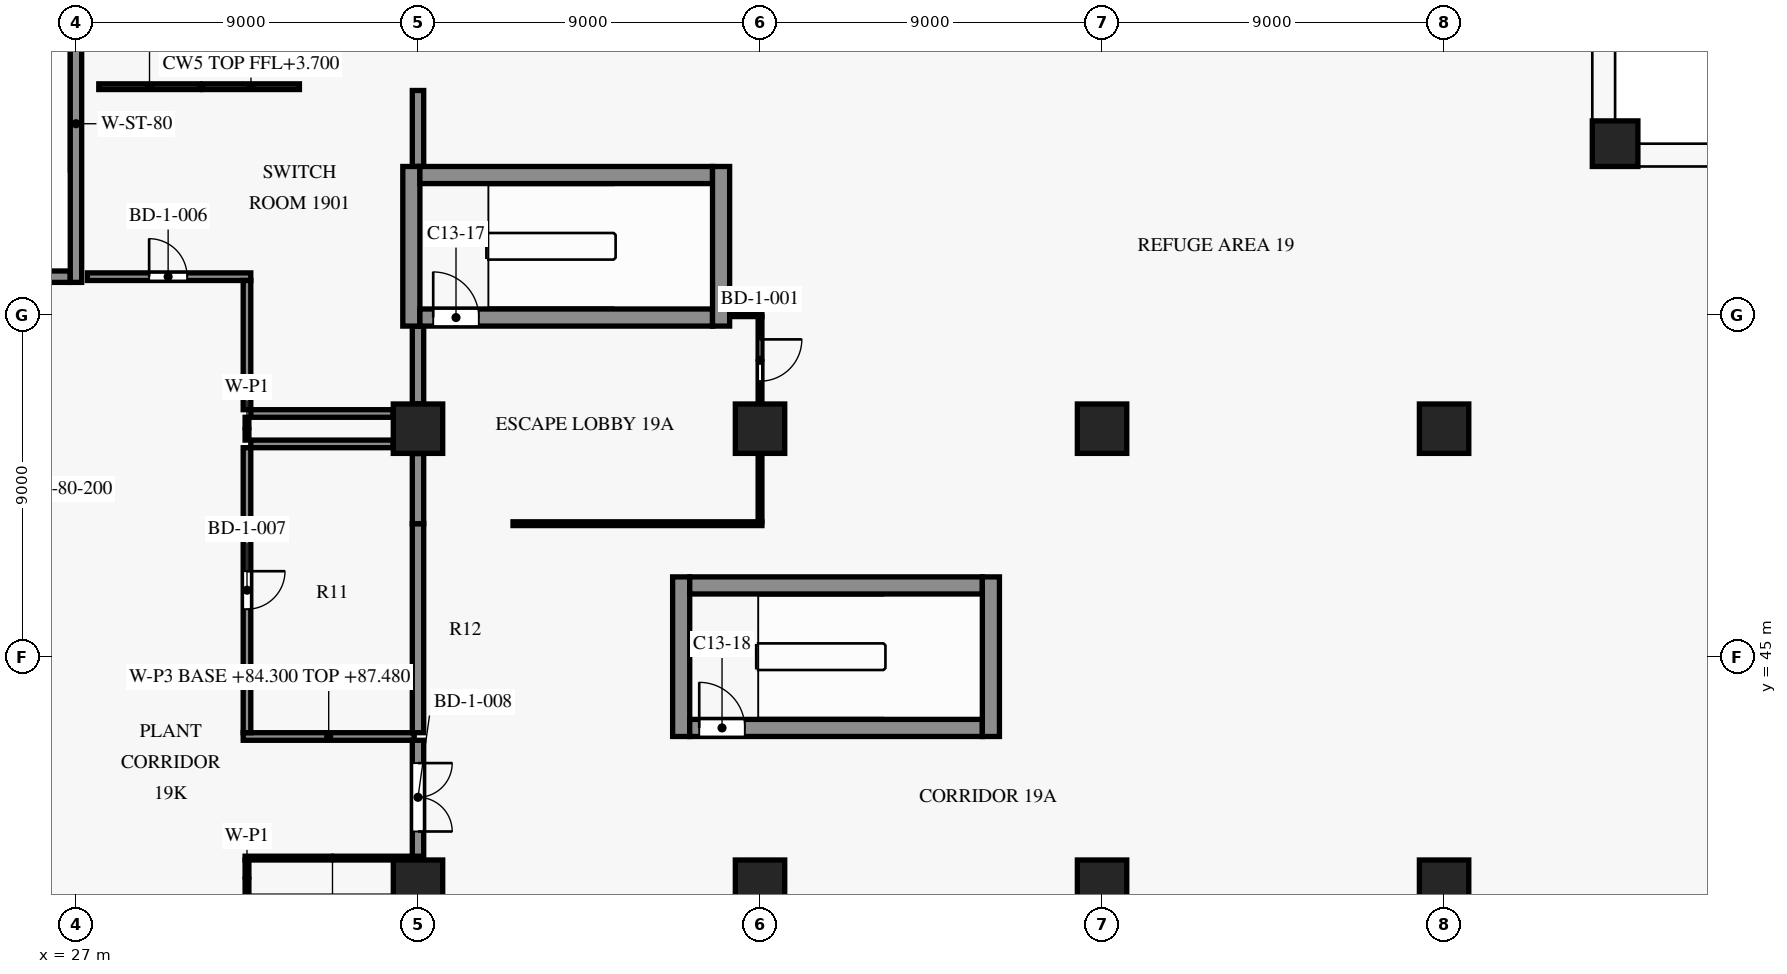
"""IFC4 building model, lengths in metres.
Left out: names, types, materials, properties, quantities, classifications, styles, units other than length and angle.
Written with IfcOpenShell. Run it as: python <this file> out.ifc"""

import sys

from ifc_helpers import new_model, si_unit, direction, frame, frame_2d, origin, origin_2d, place, context, subcontext, project, spatial, rectangle, extrude, element, fill, save


model = new_model("IFC4")
c1 = context("Model", 3, precision=1e-05, world=origin(), true_north=direction((0.0, 1.0)))
c2 = subcontext(c1, "Body", "Model", "MODEL_VIEW")
j1 = project(units=[si_unit("LENGTHUNIT", "METRE"), si_unit("PLANEANGLEUNIT", "RADIAN")], contexts=[c1])
p1 = place(None, origin())
s1 = spatial("IfcSite", under=j1, at=p1, CompositionType="ELEMENT")
p2 = place(p1, origin())
s2 = spatial("IfcBuilding", under=s1, at=p2, CompositionType="ELEMENT")
p3 = place(p2, frame((0.0, 0.0, 84.3)))
s3 = spatial("IfcBuildingStorey", under=s2, at=p3, CompositionType="ELEMENT", Elevation=84.3)
p4 = place(p3, frame((67.5, 58.5, 0.0), z_axis=(0.0, 0.0, 1.0), x_axis=(1.0, 0.0, 0.0)))
e1 = element("IfcColumn", 1, at=p4, inside=s3, PredefinedType="COLUMN", context=c2, shape_type="SweptSolid", body=[
    extrude(rectangle(XDim=1.2, YDim=1.2, at=origin_2d()), origin(), (0.0, 0.0, 1.0), 4.2),
])
for number, where, z_axis, x_axis in (
    (2, (36.0, 39.0, 0.0), (0.0, 0.0, 1.0), (1.0, 0.0, 0.0)),
    (3, (36.0, 51.0, 0.0), (0.0, 0.0, 1.0), (1.0, 0.0, 0.0)),
    (4, (45.0, 39.0, 0.0), (0.0, 0.0, 1.0), (1.0, 0.0, 0.0)),
    (5, (45.0, 51.0, 0.0), (0.0, 0.0, 1.0), (1.0, 0.0, 0.0)),
    (6, (54.0, 39.0, 0.0), (0.0, 0.0, 1.0), (1.0, 0.0, 0.0)),
    (7, (54.0, 51.0, 0.0), (0.0, 0.0, 1.0), (1.0, 0.0, 0.0)),
    (8, (63.0, 39.0, 0.0), (0.0, 0.0, 1.0), (1.0, 0.0, 0.0)),
    (9, (63.0, 51.0, 0.0), (0.0, 0.0, 1.0), (1.0, 0.0, 0.0)),
):
    element("IfcColumn", number, at=place(p3, frame(where, z_axis=z_axis, x_axis=x_axis)), inside=s3, PredefinedType="COLUMN", context=c2, shape_type="SweptSolid", body=[
        extrude(rectangle(XDim=1.3, YDim=1.3, at=origin_2d()), origin(), (0.0, 0.0, 1.0), 4.2),
    ])
p5 = place(p3, frame((43.15, 43.125, 0.0), z_axis=(0.0, 0.0, 1.0), x_axis=(1.0, 0.0, 0.0)))
e10 = element("IfcWall", 10, at=p5, inside=s3, PredefinedType="SHEAR", context=c2, shape_type="SweptSolid", body=[
    extrude(rectangle(XDim=7.7, YDim=0.45, at=frame_2d((3.85, 0.0))), origin(), (0.0, 0.0, 1.0), 3.9),
])
p6 = place(p5, frame((0.25, 0.0, 0.0)))
e11 = element("IfcOpeningElement", 11, at=p6, cuts=e10, PredefinedType="OPENING", context=c2, shape_type="SweptSolid", body=[
    extrude(rectangle(XDim=1.2, YDim=2.2, at=frame_2d((0.6, 1.1))), frame((0.0, 0.235, 0.0), z_axis=(0.0, -1.0, 0.0), x_axis=(1.0, 0.0, 0.0)), (0.0, 0.0, 1.0), 0.47),
])
p7 = place(p3, frame((43.15, 46.875, 0.0), z_axis=(0.0, 0.0, 1.0), x_axis=(1.0, 0.0, 0.0)))
e12 = element("IfcWall", 12, at=p7, inside=s3, PredefinedType="SHEAR", context=c2, shape_type="SweptSolid", body=[
    extrude(rectangle(XDim=7.7, YDim=0.45, at=frame_2d((3.85, 0.0))), origin(), (0.0, 0.0, 1.0), 3.9),
])
p8 = place(p3, frame((36.05, 53.925, 0.0), z_axis=(0.0, 0.0, 1.0), x_axis=(1.0, 0.0, 0.0)))
e13 = element("IfcWall", 13, at=p8, inside=s3, PredefinedType="SHEAR", context=c2, shape_type="SweptSolid", body=[
    extrude(rectangle(XDim=7.7, YDim=0.45, at=frame_2d((3.85, 0.0))), origin(), (0.0, 0.0, 1.0), 3.9),
])
p9 = place(p8, frame((0.35, 0.0, 0.0)))
e14 = element("IfcOpeningElement", 14, at=p9, cuts=e13, PredefinedType="OPENING", context=c2, shape_type="SweptSolid", body=[
    extrude(rectangle(XDim=1.2, YDim=2.2, at=frame_2d((0.6, 1.1))), frame((0.0, 0.235, 0.0), z_axis=(0.0, -1.0, 0.0), x_axis=(1.0, 0.0, 0.0)), (0.0, 0.0, 1.0), 0.47),
])
p10 = place(p3, frame((23.4, 55.0, 0.0), z_axis=(0.0, 0.0, 1.0), x_axis=(1.0, 0.0, 0.0)))
e15 = element("IfcWall", 15, at=p10, inside=s3, PredefinedType="SHEAR", context=c2, shape_type="SweptSolid", body=[
    extrude(rectangle(XDim=3.45, YDim=0.3, at=frame_2d((1.725, 0.0))), origin(), (0.0, 0.0, 1.0), 3.9),
])
p11 = place(p3, frame((36.05, 57.675, 0.0), z_axis=(0.0, 0.0, 1.0), x_axis=(1.0, 0.0, 0.0)))
e16 = element("IfcWall", 16, at=p11, inside=s3, PredefinedType="SHEAR", context=c2, shape_type="SweptSolid", body=[
    extrude(rectangle(XDim=7.7, YDim=0.45, at=frame_2d((3.85, 0.0))), origin(), (0.0, 0.0, 1.0), 3.9),
])
p12 = place(p3, frame((27.0, 54.85, 0.0), z_axis=(0.0, 0.0, 1.0), x_axis=(0.0, 1.0, 0.0)))
e17 = element("IfcWall", 17, at=p12, inside=s3, PredefinedType="SHEAR", context=c2, shape_type="SweptSolid", body=[
    extrude(rectangle(XDim=8.35, YDim=0.3, at=frame_2d((4.175, 0.0))), origin(), (0.0, 0.0, 1.0), 3.9),
])
p13 = place(p12, frame((6.55, 0.0, 0.0)))
e18 = element("IfcOpeningElement", 18, at=p13, cuts=e17, PredefinedType="OPENING", context=c2, shape_type="SweptSolid", body=[
    extrude(rectangle(XDim=1.2, YDim=2.2, at=frame_2d((0.6, 1.1))), frame((0.0, 0.16, 0.0), z_axis=(0.0, -1.0, 0.0), x_axis=(1.0, 0.0, 0.0)), (0.0, 0.0, 1.0), 0.32),
])
p14 = place(p3, frame((35.825, 53.7, 0.0), z_axis=(0.0, 0.0, 1.0), x_axis=(0.0, 1.0, 0.0)))
e19 = element("IfcWall", 19, at=p14, inside=s3, PredefinedType="SHEAR", context=c2, shape_type="SweptSolid", body=[
    extrude(rectangle(XDim=4.2, YDim=0.45, at=frame_2d((2.1, 0.0))), origin(), (0.0, 0.0, 1.0), 3.9),
])
p15 = place(p3, frame((42.925, 42.9, 0.0), z_axis=(0.0, 0.0, 1.0), x_axis=(0.0, 1.0, 0.0)))
e20 = element("IfcWall", 20, at=p15, inside=s3, PredefinedType="SHEAR", context=c2, shape_type="SweptSolid", body=[
    extrude(rectangle(XDim=4.2, YDim=0.45, at=frame_2d((2.1, 0.0))), origin(), (0.0, 0.0, 1.0), 3.9),
])
p16 = place(p3, frame((43.975, 53.7, 0.0), z_axis=(0.0, 0.0, 1.0), x_axis=(0.0, 1.0, 0.0)))
e21 = element("IfcWall", 21, at=p16, inside=s3, PredefinedType="SHEAR", context=c2, shape_type="SweptSolid", body=[
    extrude(rectangle(XDim=4.2, YDim=0.45, at=frame_2d((2.1, 0.0))), origin(), (0.0, 0.0, 1.0), 3.9),
])
p17 = place(p3, frame((51.075, 42.9, 0.0), z_axis=(0.0, 0.0, 1.0), x_axis=(0.0, 1.0, 0.0)))
e22 = element("IfcWall", 22, at=p17, inside=s3, PredefinedType="SHEAR", context=c2, shape_type="SweptSolid", body=[
    extrude(rectangle(XDim=4.2, YDim=0.45, at=frame_2d((2.1, 0.0))), origin(), (0.0, 0.0, 1.0), 3.9),
])
p18 = place(p3, frame((31.5, 39.65, 0.0), z_axis=(0.0, 0.0, 1.0), x_axis=(0.0, -1.0, 0.0)))
e23 = element("IfcWall", 23, at=p18, inside=s3, PredefinedType="PARTITIONING", context=c2, shape_type="SweptSolid", body=[
    extrude(rectangle(XDim=0.95, YDim=0.1, at=frame_2d((0.475, 0.0))), origin(), (0.0, 0.0, 1.0), 3.88),
])
p19 = place(p3, frame((36.05, 39.7, 0.0), z_axis=(0.0, 0.0, 1.0), x_axis=(-1.0, 0.0, 0.0)))
e24 = element("IfcWall", 24, at=p19, inside=s3, PredefinedType="PARTITIONING", context=c2, shape_type="SweptSolid", body=[
    extrude(rectangle(XDim=4.6, YDim=0.1, at=frame_2d((2.3, 0.0))), origin(), (0.0, 0.0, 1.0), 3.18),
])
p20 = place(p3, frame((36.0, 42.8, 0.0), z_axis=(0.0, 0.0, 1.0), x_axis=(0.0, -1.0, 0.0)))
e25 = element("IfcWall", 25, at=p20, inside=s3, PredefinedType="PARTITIONING", context=c2, shape_type="SweptSolid", body=[
    extrude(rectangle(XDim=3.05, YDim=0.3, at=frame_2d((1.525, 0.0))), origin(), (0.0, 0.0, 1.0), 3.18),
])
p21 = place(p20, frame((0.6, 0.0, 0.0)))
e26 = element("IfcOpeningElement", 26, at=p21, cuts=e25, PredefinedType="OPENING", context=c2, shape_type="SweptSolid", body=[
    extrude(rectangle(XDim=1.8, YDim=2.1, at=frame_2d((0.9, 1.05))), frame((0.0, 0.16, 0.0), z_axis=(0.0, -1.0, 0.0), x_axis=(1.0, 0.0, 0.0)), (0.0, 0.0, 1.0), 0.32),
])
p22 = place(p3, frame((31.4, 42.9, 0.0), z_axis=(0.0, 0.0, 1.0), x_axis=(1.0, 0.0, 0.0)))
e27 = element("IfcWall", 27, at=p22, inside=s3, PredefinedType="PARTITIONING", context=c2, shape_type="SweptSolid", body=[
    extrude(rectangle(XDim=4.5, YDim=0.2, at=frame_2d((2.25, 0.0))), origin(), (0.0, 0.0, 1.0), 3.18),
])
p23 = place(p3, frame((36.0, 48.5, 0.0), z_axis=(0.0, 0.0, 1.0), x_axis=(0.0, -1.0, 0.0)))
e28 = element("IfcWall", 28, at=p23, inside=s3, PredefinedType="PARTITIONING", context=c2, shape_type="SweptSolid", body=[
    extrude(rectangle(XDim=5.5, YDim=0.3, at=frame_2d((2.75, 0.0))), origin(), (0.0, 0.0, 1.0), 3.18),
])
p24 = place(p3, frame((36.0, 48.5, 0.0), z_axis=(0.0, 0.0, 1.0), x_axis=(0.0, 1.0, 0.0)))
e29 = element("IfcWall", 29, at=p24, inside=s3, PredefinedType="PARTITIONING", context=c2, shape_type="SweptSolid", body=[
    extrude(rectangle(XDim=1.845, YDim=0.3, at=frame_2d((0.922, 0.0))), origin(), (0.0, 0.0, 1.0), 3.18),
])
p25 = place(p3, frame((45.05, 48.5, 0.0), z_axis=(0.0, 0.0, 1.0), x_axis=(-1.0, 0.0, 0.0)))
e30 = element("IfcWall", 30, at=p25, inside=s3, PredefinedType="PARTITIONING", context=c2, shape_type="SweptSolid", body=[
    extrude(rectangle(XDim=6.55, YDim=0.1, at=frame_2d((3.275, 0.0))), origin(), (0.0, 0.0, 1.0), 3.28),
])
p26 = place(p3, frame((45.0, 50.345, 0.0), z_axis=(0.0, 0.0, 1.0), x_axis=(0.0, -1.0, 0.0)))
e31 = element("IfcWall", 31, at=p26, inside=s3, PredefinedType="PARTITIONING", context=c2, shape_type="SweptSolid", body=[
    extrude(rectangle(XDim=1.795, YDim=0.1, at=frame_2d((0.897, 0.0))), origin(), (0.0, 0.0, 1.0), 3.28),
])
p27 = place(p3, frame((31.5, 50.5, 0.0), z_axis=(0.0, 0.0, 1.0), x_axis=(0.0, -1.0, 0.0)))
e32 = element("IfcWall", 32, at=p27, inside=s3, PredefinedType="PARTITIONING", context=c2, shape_type="SweptSolid", body=[
    extrude(rectangle(XDim=7.5, YDim=0.2, at=frame_2d((3.75, 0.0))), origin(), (0.0, 0.0, 1.0), 3.88),
])
p28 = place(p27, frame((3.25, 0.0, 0.0)))
e33 = element("IfcOpeningElement", 33, at=p28, cuts=e32, PredefinedType="OPENING", context=c2, shape_type="SweptSolid", body=[
    extrude(rectangle(XDim=1.0, YDim=2.1, at=frame_2d((0.5, 1.05))), frame((0.0, 0.11, 0.0), z_axis=(0.0, -1.0, 0.0), x_axis=(1.0, 0.0, 0.0)), (0.0, 0.0, 1.0), 0.22),
])
p29 = place(p3, frame((31.6, 50.6, 0.0), z_axis=(0.0, 0.0, 1.0), x_axis=(1.0, 0.0, 0.0)))
e34 = element("IfcWall", 34, at=p29, inside=s3, PredefinedType="PARTITIONING", context=c2, shape_type="SweptSolid", body=[
    extrude(rectangle(XDim=3.745, YDim=0.2, at=frame_2d((1.873, 0.0))), origin(), (0.0, 0.0, 1.0), 3.88),
])
p30 = place(p3, frame((31.5, 51.3, 0.0), z_axis=(0.0, 0.0, 1.0), x_axis=(0.0, -1.0, 0.0)))
e35 = element("IfcWall", 35, at=p30, inside=s3, PredefinedType="PARTITIONING", context=c2, shape_type="SweptSolid", body=[
    extrude(rectangle(XDim=0.6, YDim=0.1, at=frame_2d((0.3, 0.0))), origin(), (0.0, 0.0, 1.0), 3.88),
])
p31 = place(p3, frame((35.345, 51.4, 0.0), z_axis=(0.0, 0.0, 1.0), x_axis=(-1.0, 0.0, 0.0)))
e36 = element("IfcWall", 36, at=p31, inside=s3, PredefinedType="PARTITIONING", context=c2, shape_type="SweptSolid", body=[
    extrude(rectangle(XDim=3.745, YDim=0.2, at=frame_2d((1.873, 0.0))), origin(), (0.0, 0.0, 1.0), 3.88),
])
p32 = place(p3, frame((36.0, 51.655, 0.0), z_axis=(0.0, 0.0, 1.0), x_axis=(0.0, 1.0, 0.0)))
e37 = element("IfcWall", 37, at=p32, inside=s3, PredefinedType="PARTITIONING", context=c2, shape_type="SweptSolid", body=[
    extrude(rectangle(XDim=2.045, YDim=0.3, at=frame_2d((1.022, 0.0))), origin(), (0.0, 0.0, 1.0), 3.18),
])
p33 = place(p3, frame((45.0, 53.95, 0.0), z_axis=(0.0, 0.0, 1.0), x_axis=(0.0, -1.0, 0.0)))
e38 = element("IfcWall", 38, at=p33, inside=s3, PredefinedType="PARTITIONING", context=c2, shape_type="SweptSolid", body=[
    extrude(rectangle(XDim=2.295, YDim=0.1, at=frame_2d((1.147, 0.0))), origin(), (0.0, 0.0, 1.0), 3.28),
])
p34 = place(p33, frame((0.6, 0.0, 0.0)))
e39 = element("IfcOpeningElement", 39, at=p34, cuts=e38, PredefinedType="OPENING", context=c2, shape_type="SweptSolid", body=[
    extrude(rectangle(XDim=1.1, YDim=2.1, at=frame_2d((0.55, 1.05))), frame((0.0, 0.06, 0.0), z_axis=(0.0, -1.0, 0.0), x_axis=(1.0, 0.0, 0.0)), (0.0, 0.0, 1.0), 0.12),
])
p35 = place(p3, frame((44.2, 54.0, 0.0), z_axis=(0.0, 0.0, 1.0), x_axis=(1.0, 0.0, 0.0)))
e40 = element("IfcWall", 40, at=p35, inside=s3, PredefinedType="PARTITIONING", context=c2, shape_type="SweptSolid", body=[
    extrude(rectangle(XDim=0.85, YDim=0.1, at=frame_2d((0.425, 0.0))), origin(), (0.0, 0.0, 1.0), 3.28),
])
p36 = place(p3, frame((31.5, 54.9, 0.0), z_axis=(0.0, 0.0, 1.0), x_axis=(0.0, -1.0, 0.0)))
e41 = element("IfcWall", 41, at=p36, inside=s3, PredefinedType="PARTITIONING", context=c2, shape_type="SweptSolid", body=[
    extrude(rectangle(XDim=3.4, YDim=0.2, at=frame_2d((1.7, 0.0))), origin(), (0.0, 0.0, 1.0), 3.88),
])
p37 = place(p3, frame((27.3, 55.0, 0.0), z_axis=(0.0, 0.0, 1.0), x_axis=(1.0, 0.0, 0.0)))
e42 = element("IfcWall", 42, at=p37, inside=s3, PredefinedType="PARTITIONING", context=c2, shape_type="SweptSolid", body=[
    extrude(rectangle(XDim=4.3, YDim=0.2, at=frame_2d((2.15, 0.0))), origin(), (0.0, 0.0, 1.0), 3.88),
])
p38 = place(p37, frame((1.625, 0.0, 0.0)))
e43 = element("IfcOpeningElement", 43, at=p38, cuts=e42, PredefinedType="OPENING", context=c2, shape_type="SweptSolid", body=[
    extrude(rectangle(XDim=1.0, YDim=2.1, at=frame_2d((0.5, 1.05))), frame((0.0, 0.11, 0.0), z_axis=(0.0, -1.0, 0.0), x_axis=(1.0, 0.0, 0.0)), (0.0, 0.0, 1.0), 0.22),
])
p39 = place(p3, frame((36.0, 59.9, 0.0), z_axis=(0.0, 0.0, 1.0), x_axis=(0.0, -1.0, 0.0)))
e44 = element("IfcWall", 44, at=p39, inside=s3, PredefinedType="PARTITIONING", context=c2, shape_type="SweptSolid", body=[
    extrude(rectangle(XDim=2.0, YDim=0.3, at=frame_2d((1.0, 0.0))), origin(), (0.0, 0.0, 1.0), 3.18),
])
p40 = place(p9, origin())
e45 = element("IfcDoor", 45, at=p40, inside=s3, OperationType="SINGLE_SWING_LEFT", PredefinedType="DOOR", context=c2, shape_type="SweptSolid", body=[
    extrude(rectangle(XDim=1.2, YDim=2.2, at=frame_2d((0.6, 1.1))), frame((0.0, 0.025, 0.0), z_axis=(0.0, -1.0, 0.0), x_axis=(1.0, 0.0, 0.0)), (0.0, 0.0, 1.0), 0.05),
])
fill(e14, e45)
p41 = place(p6, origin())
e46 = element("IfcDoor", 46, at=p41, inside=s3, OperationType="SINGLE_SWING_RIGHT", PredefinedType="DOOR", context=c2, shape_type="SweptSolid", body=[
    extrude(rectangle(XDim=1.2, YDim=2.2, at=frame_2d((0.6, 1.1))), frame((0.0, 0.025, 0.0), z_axis=(0.0, -1.0, 0.0), x_axis=(1.0, 0.0, 0.0)), (0.0, 0.0, 1.0), 0.05),
])
fill(e11, e46)
p42 = place(p34, origin())
e47 = element("IfcDoor", 47, at=p42, inside=s3, OperationType="SINGLE_SWING_LEFT", PredefinedType="DOOR", context=c2, shape_type="SweptSolid", body=[
    extrude(rectangle(XDim=1.1, YDim=2.1, at=frame_2d((0.55, 1.05))), frame((0.0, 0.025, 0.0), z_axis=(0.0, -1.0, 0.0), x_axis=(1.0, 0.0, 0.0)), (0.0, 0.0, 1.0), 0.05),
])
fill(e39, e47)
p43 = place(p38, origin())
e48 = element("IfcDoor", 48, at=p43, inside=s3, OperationType="SINGLE_SWING_LEFT", PredefinedType="DOOR", context=c2, shape_type="SweptSolid", body=[
    extrude(rectangle(XDim=1.0, YDim=2.1, at=frame_2d((0.5, 1.05))), frame((0.0, 0.025, 0.0), z_axis=(0.0, -1.0, 0.0), x_axis=(1.0, 0.0, 0.0)), (0.0, 0.0, 1.0), 0.05),
])
fill(e43, e48)
p44 = place(p28, origin())
e49 = element("IfcDoor", 49, at=p44, inside=s3, OperationType="SINGLE_SWING_LEFT", PredefinedType="DOOR", context=c2, shape_type="SweptSolid", body=[
    extrude(rectangle(XDim=1.0, YDim=2.1, at=frame_2d((0.5, 1.05))), frame((0.0, 0.025, 0.0), z_axis=(0.0, -1.0, 0.0), x_axis=(1.0, 0.0, 0.0)), (0.0, 0.0, 1.0), 0.05),
])
fill(e33, e49)
p45 = place(p21, origin())
e50 = element("IfcDoor", 50, at=p45, inside=s3, OperationType="DOUBLE_DOOR_SINGLE_SWING", PredefinedType="DOOR", context=c2, shape_type="SweptSolid", body=[
    extrude(rectangle(XDim=1.8, YDim=2.1, at=frame_2d((0.9, 1.05))), frame((0.0, 0.025, 0.0), z_axis=(0.0, -1.0, 0.0), x_axis=(1.0, 0.0, 0.0)), (0.0, 0.0, 1.0), 0.05),
])
fill(e26, e50)
save(model, sys.argv[1])
